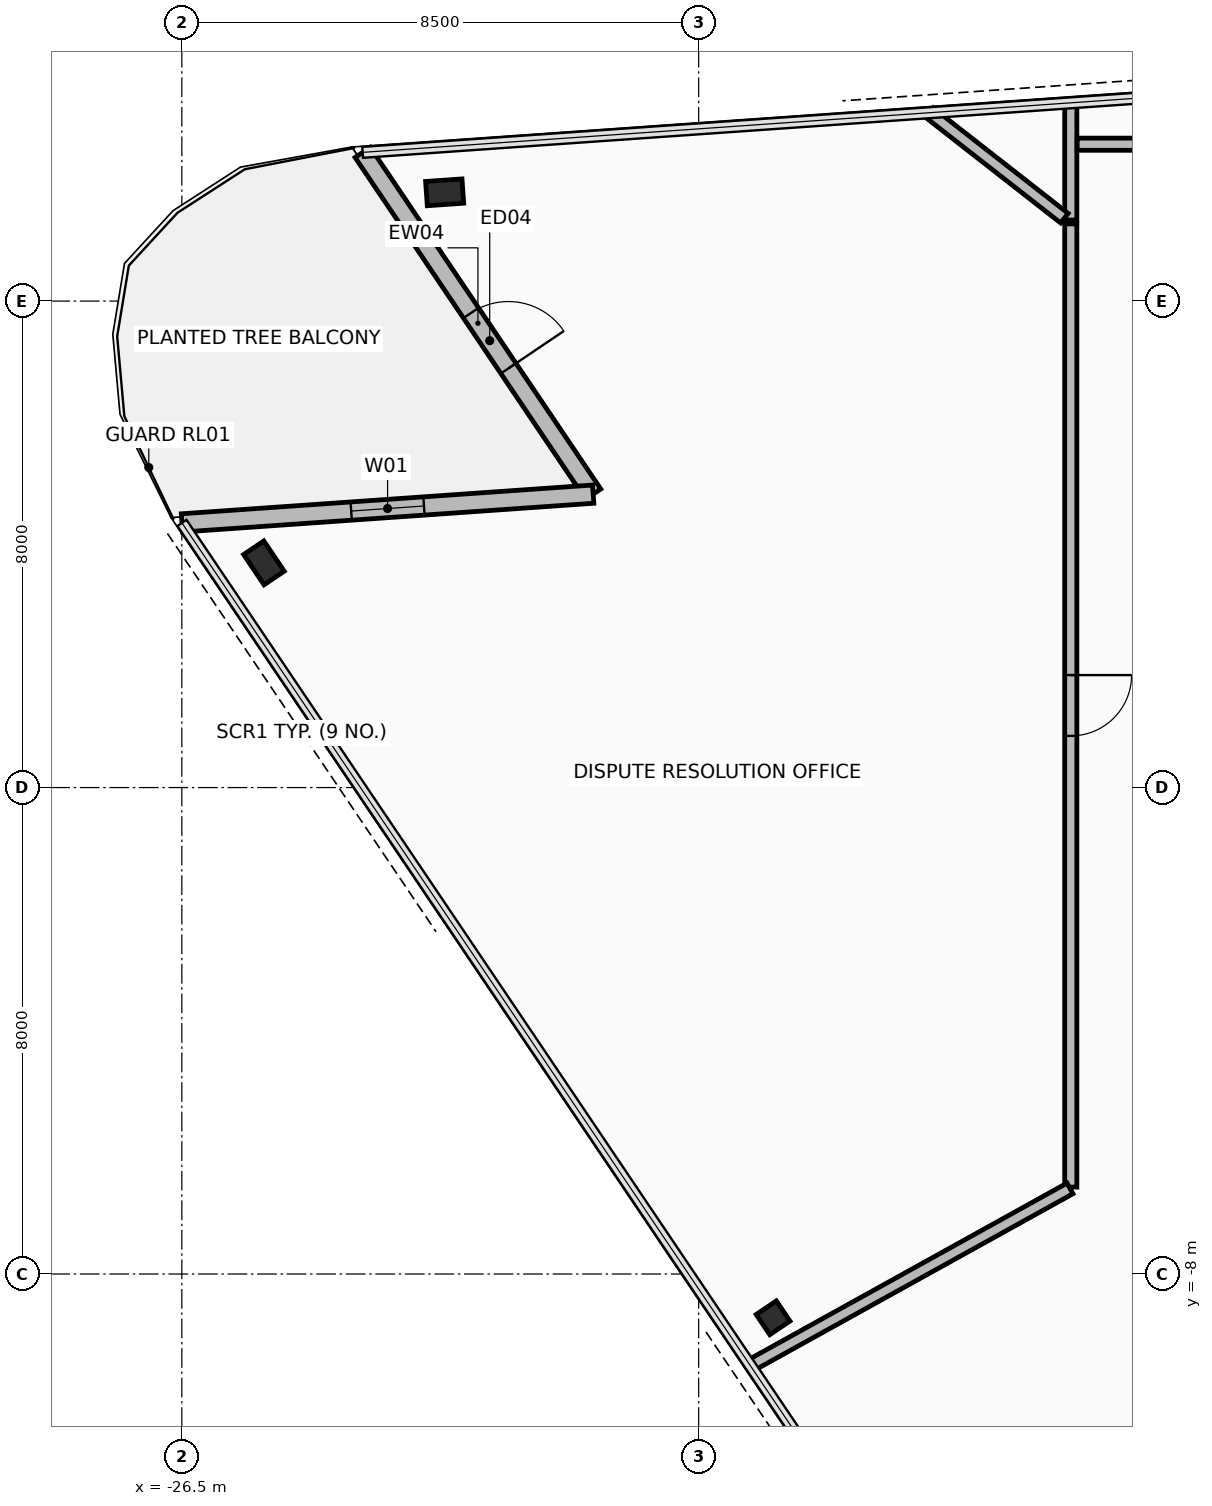
"""IFC4 building model, lengths in metres.
Left out: names, types, materials, properties, quantities, classifications, styles, units other than length and angle.
Written with IfcOpenShell. Run it as: python <this file> out.ifc"""

import sys

from ifc_helpers import new_model, si_unit, direction, frame, frame_2d, origin, origin_2d, place, context, subcontext, project, spatial, rectangle, hollow_rectangle, extrude, element, fill, save


model = new_model("IFC4")
c1 = context("Model", 3, precision=1e-05, world=origin(), true_north=direction((0.0, 1.0)))
c2 = subcontext(c1, "Body", "Model", "MODEL_VIEW")
j1 = project(units=[si_unit("LENGTHUNIT", "METRE"), si_unit("PLANEANGLEUNIT", "RADIAN")], contexts=[c1])
p1 = place(None, origin())
s1 = spatial("IfcSite", under=j1, at=p1, CompositionType="ELEMENT")
p2 = place(p1, origin())
s2 = spatial("IfcBuilding", under=s1, at=p2, CompositionType="ELEMENT")
p3 = place(p2, frame((0.0, 0.0, 267.8)))
s3 = spatial("IfcBuildingStorey", under=s2, at=p3, CompositionType="ELEMENT", Elevation=267.8)
p4 = place(p3, frame((-25.15, 3.695, 0.0), z_axis=(0.0, 0.0, 1.0), x_axis=(-0.559192903471, 0.829037572555, 0.0)))
e1 = element("IfcColumn", 1, at=p4, inside=s3, PredefinedType="COLUMN", context=c2, shape_type="SweptSolid", body=[
    extrude(hollow_rectangle(XDim=0.4, YDim=0.6, WallThickness=0.03, at=origin_2d()), origin(), (0.0, 0.0, 1.0), 3.6),
])
p5 = place(p3, frame((-16.776, -8.72, 0.0), z_axis=(0.0, 0.0, 1.0), x_axis=(-0.559192903471, 0.829037572555, 0.0)))
e2 = element("IfcColumn", 2, at=p5, inside=s3, PredefinedType="COLUMN", context=c2, shape_type="SweptSolid", body=[
    extrude(hollow_rectangle(XDim=0.4, YDim=0.4, WallThickness=0.025, at=origin_2d()), origin(), (0.0, 0.0, 1.0), 3.6),
])
p6 = place(p3, frame((-22.177, 9.789, 0.0), z_axis=(0.0, 0.0, 1.0), x_axis=(0.99756392851, 0.069758214822, 0.0)))
e3 = element("IfcColumn", 3, at=p6, inside=s3, PredefinedType="COLUMN", context=c2, shape_type="SweptSolid", body=[
    extrude(hollow_rectangle(XDim=0.4, YDim=0.6, WallThickness=0.03, at=origin_2d()), origin(), (0.0, 0.0, 1.0), 3.6),
])
p7 = place(p3, frame((-23.526, 10.446, 0.0), z_axis=(0.0, 0.0, 1.0), x_axis=(0.559187716425, -0.829041071238, 0.0)))
e4 = element("IfcWall", 4, at=p7, inside=s3, PredefinedType="STANDARD", context=c2, shape_type="SweptSolid", body=[
    extrude(rectangle(XDim=6.78, YDim=0.3, at=frame_2d((3.39, 0.0))), origin(), (0.0, 0.0, 1.0), 2.765),
])
p8 = place(p7, frame((3.186, 0.0, 0.0)))
e5 = element("IfcOpeningElement", 5, at=p8, cuts=e4, PredefinedType="OPENING", context=c2, shape_type="SweptSolid", body=[
    extrude(rectangle(XDim=1.1, YDim=2.2, at=frame_2d((0.55, 1.1))), frame((0.0, 0.16, 0.0), z_axis=(0.0, -1.0, 0.0), x_axis=(1.0, 0.0, 0.0)), (0.0, 0.0, 1.0), 0.32),
])
p9 = place(p3, frame((-19.735, 4.825, 0.0), z_axis=(0.0, 0.0, 1.0), x_axis=(-0.997564507468, -0.06974993506, 0.0)))
e6 = element("IfcWall", 6, at=p9, inside=s3, PredefinedType="STANDARD", context=c2, shape_type="SweptSolid", body=[
    extrude(rectangle(XDim=6.78, YDim=0.3, at=frame_2d((3.39, 0.0))), origin(), (0.0, 0.0, 1.0), 2.765),
])
p10 = place(p9, frame((2.79, 0.0, 0.485)))
e7 = element("IfcOpeningElement", 7, at=p10, cuts=e6, PredefinedType="OPENING", context=c2, shape_type="SweptSolid", body=[
    extrude(rectangle(XDim=1.2, YDim=2.1, at=frame_2d((0.6, 1.05))), frame((0.0, 0.16, 0.0), z_axis=(0.0, -1.0, 0.0), x_axis=(1.0, 0.0, 0.0)), (0.0, 0.0, 1.0), 0.32),
])
p11 = place(p3, frame((-11.88, 11.26, 0.0), z_axis=(0.0, 0.0, 1.0), x_axis=(0.0, -1.0, 0.0)))
e8 = element("IfcWall", 8, at=p11, inside=s3, PredefinedType="PARTITIONING", context=c2, shape_type="SweptSolid", body=[
    extrude(rectangle(XDim=1.927, YDim=0.2, at=frame_2d((0.964, 0.0))), origin(), (0.0, 0.0, 1.0), 2.765),
])
p12 = place(p3, frame((-11.985, 9.364, 0.0), z_axis=(0.0, 0.0, 1.0), x_axis=(-0.787996776596, 0.615679364664, 0.0)))
e9 = element("IfcWall", 9, at=p12, inside=s3, PredefinedType="PARTITIONING", context=c2, shape_type="SweptSolid", body=[
    extrude(rectangle(XDim=2.817, YDim=0.2, at=frame_2d((1.408, 0.0))), origin(), (0.0, 0.0, 1.0), 2.765),
])
p13 = place(p3, frame((2.036, 10.58, 0.0), z_axis=(0.0, 0.0, 1.0), x_axis=(-1.0, 0.0, 0.0)))
e10 = element("IfcWall", 10, at=p13, inside=s3, PredefinedType="PARTITIONING", context=c2, shape_type="SweptSolid", body=[
    extrude(rectangle(XDim=13.811, YDim=0.2, at=frame_2d((6.905, 0.0))), origin(), (0.0, 0.0, 1.0), 2.765),
])
p14 = place(p13, frame((6.405, 0.0, 0.0)))
e11 = element("IfcOpeningElement", 11, at=p14, cuts=e10, PredefinedType="OPENING", context=c2, shape_type="SweptSolid", body=[
    extrude(rectangle(XDim=1.0, YDim=2.15, at=frame_2d((0.5, 1.075))), frame((0.0, 0.11, 0.0), z_axis=(0.0, -1.0, 0.0), x_axis=(1.0, 0.0, 0.0)), (0.0, 0.0, 1.0), 0.22),
])
p15 = place(p3, frame((-11.88, 9.27, 0.0), z_axis=(0.0, 0.0, 1.0), x_axis=(0.0, -1.0, 0.0)))
e12 = element("IfcWall", 12, at=p15, inside=s3, PredefinedType="PARTITIONING", context=c2, shape_type="SweptSolid", body=[
    extrude(rectangle(XDim=15.84, YDim=0.2, at=frame_2d((7.92, 0.0))), origin(), (0.0, 0.0, 1.0), 2.765),
])
p16 = place(p15, frame((7.42, 0.0, 0.0)))
e13 = element("IfcOpeningElement", 13, at=p16, cuts=e12, PredefinedType="OPENING", context=c2, shape_type="SweptSolid", body=[
    extrude(rectangle(XDim=1.0, YDim=2.15, at=frame_2d((0.5, 1.075))), frame((0.0, 0.11, 0.0), z_axis=(0.0, -1.0, 0.0), x_axis=(1.0, 0.0, 0.0)), (0.0, 0.0, 1.0), 0.22),
])
p17 = place(p3, frame((-11.893, -6.592, 0.0), z_axis=(0.0, 0.0, 1.0), x_axis=(-0.874620360133, -0.484808442213, 0.0)))
e14 = element("IfcWall", 14, at=p17, inside=s3, PredefinedType="PARTITIONING", context=c2, shape_type="SweptSolid", body=[
    extrude(rectangle(XDim=5.988, YDim=0.2, at=frame_2d((2.994, 0.0))), origin(), (0.0, 0.0, 1.0), 2.765),
])
p18 = place(p8, frame((1.1, 0.0, 0.0), z_axis=(0.0, 0.0, 1.0), x_axis=(-1.0, 0.0, 0.0)))
e15 = element("IfcDoor", 15, at=p18, inside=s3, OperationType="SINGLE_SWING_LEFT", PredefinedType="DOOR", context=c2, shape_type="SweptSolid", body=[
    extrude(rectangle(XDim=1.1, YDim=2.2, at=frame_2d((0.55, 1.1))), frame((0.0, 0.025, 0.0), z_axis=(0.0, -1.0, 0.0), x_axis=(1.0, 0.0, 0.0)), (0.0, 0.0, 1.0), 0.05),
])
fill(e5, e15)
p19 = place(p10, origin())
e16 = element("IfcWindow", 16, at=p19, inside=s3, PartitioningType="SINGLE_PANEL", PredefinedType="WINDOW", context=c2, shape_type="SweptSolid", body=[
    extrude(rectangle(XDim=1.2, YDim=2.1, at=frame_2d((0.6, 1.05))), frame((0.0, 0.03, 0.0), z_axis=(0.0, -1.0, 0.0), x_axis=(1.0, 0.0, 0.0)), (0.0, 0.0, 1.0), 0.06),
])
fill(e7, e16)
p20 = place(p16, origin())
e17 = element("IfcDoor", 17, at=p20, inside=s3, OperationType="SINGLE_SWING_RIGHT", PredefinedType="DOOR", context=c2, shape_type="SweptSolid", body=[
    extrude(rectangle(XDim=1.0, YDim=2.15, at=frame_2d((0.5, 1.075))), frame((0.0, 0.025, 0.0), z_axis=(0.0, -1.0, 0.0), x_axis=(1.0, 0.0, 0.0)), (0.0, 0.0, 1.0), 0.05),
])
fill(e13, e17)
save(model, sys.argv[1])
